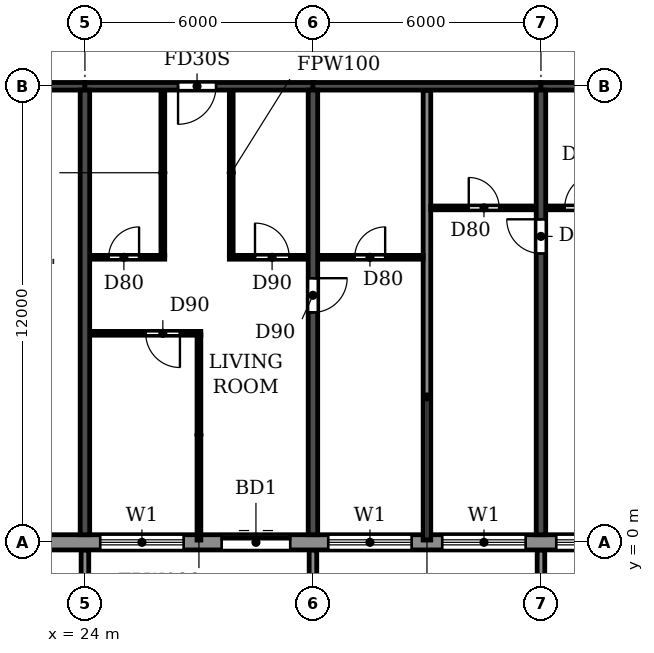
"""IFC4 building model, lengths in metres.
Left out: names, types, materials, properties, quantities, classifications, styles, units other than length and angle.
Written with IfcOpenShell. Run it as: python <this file> out.ifc"""

import sys

from ifc_helpers import new_model, si_unit, direction, frame, frame_2d, origin, place, context, subcontext, project, spatial, polyline, rectangle, outline, extrude, source, transform, mapped, element, fill, save


model = new_model("IFC4")
c1 = context("Model", 3, precision=1e-05, world=origin(), true_north=direction((0.0, 1.0)))
c2 = subcontext(c1, "Body", "Model", "MODEL_VIEW")
j1 = project(units=[si_unit("LENGTHUNIT", "METRE"), si_unit("PLANEANGLEUNIT", "RADIAN")], contexts=[c1])
p1 = place(None, origin())
s1 = spatial("IfcSite", under=j1, at=p1, CompositionType="ELEMENT")
p2 = place(p1, origin())
s2 = spatial("IfcBuilding", under=s1, at=p2, CompositionType="ELEMENT")
p3 = place(p2, frame((0.0, 0.0, 257.7)))
s3 = spatial("IfcBuildingStorey", under=s2, at=p3, CompositionType="ELEMENT", Elevation=257.7)
p4 = place(p3, frame((24.0, 0.2, 0.0), z_axis=(0.0, 0.0, 1.0), x_axis=(0.0, 1.0, 0.0)))
e1 = element("IfcWall", 1, at=p4, inside=s3, PredefinedType="SHEAR", context=c2, shape_type="SweptSolid", body=[
    extrude(rectangle(XDim=11.7, YDim=0.25, at=frame_2d((5.85, 0.0))), origin(), (0.0, 0.0, 1.0), 3.0),
])
p5 = place(p3, frame((30.0, 0.2, 0.0), z_axis=(0.0, 0.0, 1.0), x_axis=(0.0, 1.0, 0.0)))
e2 = element("IfcWall", 2, at=p5, inside=s3, PredefinedType="SHEAR", context=c2, shape_type="SweptSolid", body=[
    extrude(rectangle(XDim=11.7, YDim=0.25, at=frame_2d((5.85, 0.0))), origin(), (0.0, 0.0, 1.0), 3.0),
])
p6 = place(p5, frame((5.85, 0.0, 0.0)))
e3 = element("IfcOpeningElement", 3, at=p6, cuts=e2, PredefinedType="OPENING", context=c2, shape_type="SweptSolid", body=[
    extrude(rectangle(XDim=0.9, YDim=2.1, at=frame_2d((0.45, 1.05))), frame((0.0, 0.135, 0.0), z_axis=(0.0, -1.0, 0.0), x_axis=(1.0, 0.0, 0.0)), (0.0, 0.0, 1.0), 0.27),
])
p7 = place(p3, frame((36.0, 0.2, 0.0), z_axis=(0.0, 0.0, 1.0), x_axis=(0.0, 1.0, 0.0)))
e4 = element("IfcWall", 4, at=p7, inside=s3, PredefinedType="SHEAR", context=c2, shape_type="SweptSolid", body=[
    extrude(rectangle(XDim=11.7, YDim=0.25, at=frame_2d((5.85, 0.0))), origin(), (0.0, 0.0, 1.0), 3.0),
])
p8 = place(p7, frame((7.4, 0.0, 0.0)))
e5 = element("IfcOpeningElement", 5, at=p8, cuts=e4, PredefinedType="OPENING", context=c2, shape_type="SweptSolid", body=[
    extrude(rectangle(XDim=0.9, YDim=2.1, at=frame_2d((0.45, 1.05))), frame((0.0, 0.135, 0.0), z_axis=(0.0, -1.0, 0.0), x_axis=(1.0, 0.0, 0.0)), (0.0, 0.0, 1.0), 0.27),
])
p9 = place(p3, frame((18.2, 12.0, 0.0), z_axis=(0.0, 0.0, 1.0), x_axis=(1.0, 0.0, 0.0)))
e6 = element("IfcWall", 6, at=p9, inside=s3, PredefinedType="SHEAR", context=c2, shape_type="SweptSolid", body=[
    extrude(rectangle(XDim=5.8, YDim=0.2, at=frame_2d((2.9, 0.0))), origin(), (0.0, 0.0, 1.0), 2.4),
])
p10 = place(p9, frame((2.3, 0.0, 0.0)))
e7 = element("IfcOpeningElement", 7, at=p10, cuts=e6, PredefinedType="OPENING", context=c2, shape_type="SweptSolid", body=[
    extrude(rectangle(XDim=1.0, YDim=2.1, at=frame_2d((0.5, 1.05))), frame((0.0, 0.11, 0.0), z_axis=(0.0, -1.0, 0.0), x_axis=(1.0, 0.0, 0.0)), (0.0, 0.0, 1.0), 0.22),
])
p11 = place(p3, frame((24.0, 12.0, 0.0), z_axis=(0.0, 0.0, 1.0), x_axis=(1.0, 0.0, 0.0)))
e8 = element("IfcWall", 8, at=p11, inside=s3, PredefinedType="SHEAR", context=c2, shape_type="SweptSolid", body=[
    extrude(rectangle(XDim=6.0, YDim=0.2, at=frame_2d((3.0, 0.0))), origin(), (0.0, 0.0, 1.0), 2.4),
])
p12 = place(p11, frame((2.45, 0.0, 0.0)))
e9 = element("IfcOpeningElement", 9, at=p12, cuts=e8, PredefinedType="OPENING", context=c2, shape_type="SweptSolid", body=[
    extrude(rectangle(XDim=1.0, YDim=2.1, at=frame_2d((0.5, 1.05))), frame((0.0, 0.11, 0.0), z_axis=(0.0, -1.0, 0.0), x_axis=(1.0, 0.0, 0.0)), (0.0, 0.0, 1.0), 0.22),
])
p13 = place(p3, frame((30.0, 12.0, 0.0), z_axis=(0.0, 0.0, 1.0), x_axis=(1.0, 0.0, 0.0)))
e10 = element("IfcWall", 10, at=p13, inside=s3, PredefinedType="SHEAR", context=c2, shape_type="SweptSolid", body=[
    extrude(rectangle(XDim=6.0, YDim=0.2, at=frame_2d((3.0, 0.0))), origin(), (0.0, 0.0, 1.0), 2.4),
])
p14 = place(p3, frame((36.0, 12.0, 0.0), z_axis=(0.0, 0.0, 1.0), x_axis=(1.0, 0.0, 0.0)))
e11 = element("IfcWall", 11, at=p14, inside=s3, PredefinedType="SHEAR", context=c2, shape_type="SweptSolid", body=[
    extrude(rectangle(XDim=6.0, YDim=0.2, at=frame_2d((3.0, 0.0))), origin(), (0.0, 0.0, 1.0), 2.4),
])
p15 = place(p14, frame((2.55, 0.0, 0.0)))
e12 = element("IfcOpeningElement", 12, at=p15, cuts=e11, PredefinedType="OPENING", context=c2, shape_type="SweptSolid", body=[
    extrude(rectangle(XDim=1.0, YDim=2.1, at=frame_2d((0.5, 1.05))), frame((0.0, 0.11, 0.0), z_axis=(0.0, -1.0, 0.0), x_axis=(1.0, 0.0, 0.0)), (0.0, 0.0, 1.0), 0.22),
])
p16 = place(p3, frame((22.683, 0.0, 0.0), z_axis=(0.0, 0.0, 1.0), x_axis=(1.0, 0.0, 0.0)))
e13 = element("IfcWall", 13, at=p16, inside=s3, PredefinedType="STANDARD", context=c2, shape_type="SweptSolid", body=[
    extrude(rectangle(XDim=56.634, YDim=0.4, at=frame_2d((28.317, 0.0))), origin(), (0.0, 0.0, 1.0), 3.0),
])
p17 = place(p16, frame((1.717, 0.0, 0.9)))
e14 = element("IfcOpeningElement", 14, at=p17, cuts=e13, PredefinedType="OPENING", context=c2, shape_type="SweptSolid", body=[
    extrude(rectangle(XDim=2.2, YDim=1.5, at=frame_2d((1.1, 0.75))), frame((0.0, 0.21, 0.0), z_axis=(0.0, -1.0, 0.0), x_axis=(1.0, 0.0, 0.0)), (0.0, 0.0, 1.0), 0.42),
])
p18 = place(p16, frame((4.917, 0.0, 0.0)))
e15 = element("IfcOpeningElement", 15, at=p18, cuts=e13, PredefinedType="OPENING", context=c2, shape_type="SweptSolid", body=[
    extrude(rectangle(XDim=1.8, YDim=2.4, at=frame_2d((0.9, 1.2))), frame((0.0, 0.21, 0.0), z_axis=(0.0, -1.0, 0.0), x_axis=(1.0, 0.0, 0.0)), (0.0, 0.0, 1.0), 0.42),
])
p19 = place(p16, frame((7.717, 0.0, 0.9)))
e16 = element("IfcOpeningElement", 16, at=p19, cuts=e13, PredefinedType="OPENING", context=c2, shape_type="SweptSolid", body=[
    extrude(rectangle(XDim=2.2, YDim=1.5, at=frame_2d((1.1, 0.75))), frame((0.0, 0.21, 0.0), z_axis=(0.0, -1.0, 0.0), x_axis=(1.0, 0.0, 0.0)), (0.0, 0.0, 1.0), 0.42),
])
p20 = place(p16, frame((10.717, 0.0, 0.9)))
e17 = element("IfcOpeningElement", 17, at=p20, cuts=e13, PredefinedType="OPENING", context=c2, shape_type="SweptSolid", body=[
    extrude(rectangle(XDim=2.2, YDim=1.5, at=frame_2d((1.1, 0.75))), frame((0.0, 0.21, 0.0), z_axis=(0.0, -1.0, 0.0), x_axis=(1.0, 0.0, 0.0)), (0.0, 0.0, 1.0), 0.42),
])
p21 = place(p16, frame((13.717, 0.0, 0.9)))
e18 = element("IfcOpeningElement", 18, at=p21, cuts=e13, PredefinedType="OPENING", context=c2, shape_type="SweptSolid", body=[
    extrude(rectangle(XDim=2.2, YDim=1.5, at=frame_2d((1.1, 0.75))), frame((0.0, 0.21, 0.0), z_axis=(0.0, -1.0, 0.0), x_axis=(1.0, 0.0, 0.0)), (0.0, 0.0, 1.0), 0.42),
])
p22 = place(p16, frame((16.917, 0.0, 0.0)))
e19 = element("IfcOpeningElement", 19, at=p22, cuts=e13, PredefinedType="OPENING", context=c2, shape_type="SweptSolid", body=[
    extrude(rectangle(XDim=1.8, YDim=2.4, at=frame_2d((0.9, 1.2))), frame((0.0, 0.21, 0.0), z_axis=(0.0, -1.0, 0.0), x_axis=(1.0, 0.0, 0.0)), (0.0, 0.0, 1.0), 0.42),
])
p23 = place(p16, frame((19.717, 0.0, 0.9)))
e20 = element("IfcOpeningElement", 20, at=p23, cuts=e13, PredefinedType="OPENING", context=c2, shape_type="SweptSolid", body=[
    extrude(rectangle(XDim=2.2, YDim=1.5, at=frame_2d((1.1, 0.75))), frame((0.0, 0.21, 0.0), z_axis=(0.0, -1.0, 0.0), x_axis=(1.0, 0.0, 0.0)), (0.0, 0.0, 1.0), 0.42),
])
p24 = place(p16, frame((22.717, 0.0, 0.9)))
e21 = element("IfcOpeningElement", 21, at=p24, cuts=e13, PredefinedType="OPENING", context=c2, shape_type="SweptSolid", body=[
    extrude(rectangle(XDim=2.2, YDim=1.5, at=frame_2d((1.1, 0.75))), frame((0.0, 0.21, 0.0), z_axis=(0.0, -1.0, 0.0), x_axis=(1.0, 0.0, 0.0)), (0.0, 0.0, 1.0), 0.42),
])
p25 = place(p16, frame((25.717, 0.0, 0.9)))
e22 = element("IfcOpeningElement", 22, at=p25, cuts=e13, PredefinedType="OPENING", context=c2, shape_type="SweptSolid", body=[
    extrude(rectangle(XDim=2.2, YDim=1.5, at=frame_2d((1.1, 0.75))), frame((0.0, 0.21, 0.0), z_axis=(0.0, -1.0, 0.0), x_axis=(1.0, 0.0, 0.0)), (0.0, 0.0, 1.0), 0.42),
])
p26 = place(p16, frame((28.917, 0.0, 0.0)))
e23 = element("IfcOpeningElement", 23, at=p26, cuts=e13, PredefinedType="OPENING", context=c2, shape_type="SweptSolid", body=[
    extrude(rectangle(XDim=1.8, YDim=2.4, at=frame_2d((0.9, 1.2))), frame((0.0, 0.21, 0.0), z_axis=(0.0, -1.0, 0.0), x_axis=(1.0, 0.0, 0.0)), (0.0, 0.0, 1.0), 0.42),
])
p27 = place(p16, frame((31.717, 0.0, 0.9)))
e24 = element("IfcOpeningElement", 24, at=p27, cuts=e13, PredefinedType="OPENING", context=c2, shape_type="SweptSolid", body=[
    extrude(rectangle(XDim=2.2, YDim=1.5, at=frame_2d((1.1, 0.75))), frame((0.0, 0.21, 0.0), z_axis=(0.0, -1.0, 0.0), x_axis=(1.0, 0.0, 0.0)), (0.0, 0.0, 1.0), 0.42),
])
p28 = place(p16, frame((34.717, 0.0, 0.9)))
e25 = element("IfcOpeningElement", 25, at=p28, cuts=e13, PredefinedType="OPENING", context=c2, shape_type="SweptSolid", body=[
    extrude(rectangle(XDim=2.2, YDim=1.5, at=frame_2d((1.1, 0.75))), frame((0.0, 0.21, 0.0), z_axis=(0.0, -1.0, 0.0), x_axis=(1.0, 0.0, 0.0)), (0.0, 0.0, 1.0), 0.42),
])
p29 = place(p16, frame((37.717, 0.0, 0.9)))
e26 = element("IfcOpeningElement", 26, at=p29, cuts=e13, PredefinedType="OPENING", context=c2, shape_type="SweptSolid", body=[
    extrude(rectangle(XDim=2.2, YDim=1.5, at=frame_2d((1.1, 0.75))), frame((0.0, 0.21, 0.0), z_axis=(0.0, -1.0, 0.0), x_axis=(1.0, 0.0, 0.0)), (0.0, 0.0, 1.0), 0.42),
])
p30 = place(p16, frame((40.917, 0.0, 0.0)))
e27 = element("IfcOpeningElement", 27, at=p30, cuts=e13, PredefinedType="OPENING", context=c2, shape_type="SweptSolid", body=[
    extrude(rectangle(XDim=1.8, YDim=2.4, at=frame_2d((0.9, 1.2))), frame((0.0, 0.21, 0.0), z_axis=(0.0, -1.0, 0.0), x_axis=(1.0, 0.0, 0.0)), (0.0, 0.0, 1.0), 0.42),
])
p31 = place(p16, frame((43.717, 0.0, 0.9)))
e28 = element("IfcOpeningElement", 28, at=p31, cuts=e13, PredefinedType="OPENING", context=c2, shape_type="SweptSolid", body=[
    extrude(rectangle(XDim=2.2, YDim=1.5, at=frame_2d((1.1, 0.75))), frame((0.0, 0.21, 0.0), z_axis=(0.0, -1.0, 0.0), x_axis=(1.0, 0.0, 0.0)), (0.0, 0.0, 1.0), 0.42),
])
p32 = place(p16, frame((46.717, 0.0, 0.9)))
e29 = element("IfcOpeningElement", 29, at=p32, cuts=e13, PredefinedType="OPENING", context=c2, shape_type="SweptSolid", body=[
    extrude(rectangle(XDim=2.2, YDim=1.5, at=frame_2d((1.1, 0.75))), frame((0.0, 0.21, 0.0), z_axis=(0.0, -1.0, 0.0), x_axis=(1.0, 0.0, 0.0)), (0.0, 0.0, 1.0), 0.42),
])
p33 = place(p16, frame((49.717, 0.0, 0.9)))
e30 = element("IfcOpeningElement", 30, at=p33, cuts=e13, PredefinedType="OPENING", context=c2, shape_type="SweptSolid", body=[
    extrude(rectangle(XDim=2.2, YDim=1.5, at=frame_2d((1.1, 0.75))), frame((0.0, 0.21, 0.0), z_axis=(0.0, -1.0, 0.0), x_axis=(1.0, 0.0, 0.0)), (0.0, 0.0, 1.0), 0.42),
])
p34 = place(p16, frame((52.917, 0.0, 0.0)))
e31 = element("IfcOpeningElement", 31, at=p34, cuts=e13, PredefinedType="OPENING", context=c2, shape_type="SweptSolid", body=[
    extrude(rectangle(XDim=1.8, YDim=2.4, at=frame_2d((0.9, 1.2))), frame((0.0, 0.21, 0.0), z_axis=(0.0, -1.0, 0.0), x_axis=(1.0, 0.0, 0.0)), (0.0, 0.0, 1.0), 0.42),
])
m1 = source(origin(), c2, "Body", "SweptSolid", [
    extrude(outline(polyline([(0.0, 0.0), (0.2, 0.0), (0.2, 1.65), (0.0, 1.65), (0.0, 0.0)])), origin(), (0.0, 0.0, 1.0), 3.1),
])
for number, where in (
    (32, (23.9, -1.85, 0.0)),
    (33, (29.9, -1.85, 0.0)),
    (34, (35.9, -1.85, 0.0)),
):
    element("IfcWall", number, at=place(p3, frame(where)), inside=s3, PredefinedType="STANDARD", context=c2, shape_type="MappedRepresentation", body=[
        mapped(m1, transform((0.0, 0.0, 0.0))),
    ])
p35 = place(p3, frame((33.0, 0.06, 0.0), z_axis=(0.0, 0.0, 1.0), x_axis=(0.0, 1.0, 0.0)))
e35 = element("IfcWall", 35, at=p35, inside=s3, PredefinedType="PARTITIONING", context=c2, shape_type="SweptSolid", body=[
    extrude(rectangle(XDim=11.83, YDim=0.2, at=frame_2d((5.915, 0.0))), origin(), (0.0, 0.0, 1.0), 3.0),
])
p36 = place(p3, frame((24.135, 5.5, 0.0), z_axis=(0.0, 0.0, 1.0), x_axis=(1.0, 0.0, 0.0)))
e36 = element("IfcWall", 36, at=p36, inside=s3, PredefinedType="PARTITIONING", context=c2, shape_type="SweptSolid", body=[
    extrude(rectangle(XDim=2.915, YDim=0.1, at=frame_2d((1.458, 0.0))), origin(), (0.0, 0.0, 1.0), 3.0),
])
p37 = place(p36, frame((1.465, 0.0, 0.0)))
e37 = element("IfcOpeningElement", 37, at=p37, cuts=e36, PredefinedType="OPENING", context=c2, shape_type="SweptSolid", body=[
    extrude(rectangle(XDim=0.9, YDim=2.1, at=frame_2d((0.45, 1.05))), frame((0.0, 0.06, 0.0), z_axis=(0.0, -1.0, 0.0), x_axis=(1.0, 0.0, 0.0)), (0.0, 0.0, 1.0), 0.12),
])
p38 = place(p3, frame((24.135, 7.5, 0.0), z_axis=(0.0, 0.0, 1.0), x_axis=(1.0, 0.0, 0.0)))
e38 = element("IfcWall", 38, at=p38, inside=s3, PredefinedType="PARTITIONING", context=c2, shape_type="SweptSolid", body=[
    extrude(rectangle(XDim=1.965, YDim=0.1, at=frame_2d((0.982, 0.0))), origin(), (0.0, 0.0, 1.0), 3.0),
])
p39 = place(p38, frame((0.49, 0.0, 0.0)))
e39 = element("IfcOpeningElement", 39, at=p39, cuts=e38, PredefinedType="OPENING", context=c2, shape_type="SweptSolid", body=[
    extrude(rectangle(XDim=0.8, YDim=2.1, at=frame_2d((0.4, 1.05))), frame((0.0, 0.06, 0.0), z_axis=(0.0, -1.0, 0.0), x_axis=(1.0, 0.0, 0.0)), (0.0, 0.0, 1.0), 0.12),
])
p40 = place(p3, frame((27.8, 7.5, 0.0), z_axis=(0.0, 0.0, 1.0), x_axis=(1.0, 0.0, 0.0)))
e40 = element("IfcWall", 40, at=p40, inside=s3, PredefinedType="PARTITIONING", context=c2, shape_type="SweptSolid", body=[
    extrude(rectangle(XDim=2.065, YDim=0.1, at=frame_2d((1.032, 0.0))), origin(), (0.0, 0.0, 1.0), 3.0),
])
p41 = place(p40, frame((0.675, 0.0, 0.0)))
e41 = element("IfcOpeningElement", 41, at=p41, cuts=e40, PredefinedType="OPENING", context=c2, shape_type="SweptSolid", body=[
    extrude(rectangle(XDim=0.9, YDim=2.1, at=frame_2d((0.45, 1.05))), frame((0.0, 0.06, 0.0), z_axis=(0.0, -1.0, 0.0), x_axis=(1.0, 0.0, 0.0)), (0.0, 0.0, 1.0), 0.12),
])
p42 = place(p3, frame((30.135, 7.5, 0.0), z_axis=(0.0, 0.0, 1.0), x_axis=(1.0, 0.0, 0.0)))
e42 = element("IfcWall", 42, at=p42, inside=s3, PredefinedType="PARTITIONING", context=c2, shape_type="SweptSolid", body=[
    extrude(rectangle(XDim=2.765, YDim=0.1, at=frame_2d((1.382, 0.0))), origin(), (0.0, 0.0, 1.0), 3.0),
])
p43 = place(p42, frame((0.965, 0.0, 0.0)))
e43 = element("IfcOpeningElement", 43, at=p43, cuts=e42, PredefinedType="OPENING", context=c2, shape_type="SweptSolid", body=[
    extrude(rectangle(XDim=0.8, YDim=2.1, at=frame_2d((0.4, 1.05))), frame((0.0, 0.06, 0.0), z_axis=(0.0, -1.0, 0.0), x_axis=(1.0, 0.0, 0.0)), (0.0, 0.0, 1.0), 0.12),
])
p44 = place(p3, frame((33.1, 8.8, 0.0), z_axis=(0.0, 0.0, 1.0), x_axis=(1.0, 0.0, 0.0)))
e44 = element("IfcWall", 44, at=p44, inside=s3, PredefinedType="PARTITIONING", context=c2, shape_type="SweptSolid", body=[
    extrude(rectangle(XDim=2.765, YDim=0.1, at=frame_2d((1.382, 0.0))), origin(), (0.0, 0.0, 1.0), 3.0),
])
p45 = place(p44, frame((1.0, 0.0, 0.0)))
e45 = element("IfcOpeningElement", 45, at=p45, cuts=e44, PredefinedType="OPENING", context=c2, shape_type="SweptSolid", body=[
    extrude(rectangle(XDim=0.8, YDim=2.1, at=frame_2d((0.4, 1.05))), frame((0.0, 0.06, 0.0), z_axis=(0.0, -1.0, 0.0), x_axis=(1.0, 0.0, 0.0)), (0.0, 0.0, 1.0), 0.12),
])
p46 = place(p3, frame((36.135, 8.8, 0.0), z_axis=(0.0, 0.0, 1.0), x_axis=(1.0, 0.0, 0.0)))
e46 = element("IfcWall", 46, at=p46, inside=s3, PredefinedType="PARTITIONING", context=c2, shape_type="SweptSolid", body=[
    extrude(rectangle(XDim=2.065, YDim=0.1, at=frame_2d((1.032, 0.0))), origin(), (0.0, 0.0, 1.0), 3.0),
])
p47 = place(p46, frame((0.49, 0.0, 0.0)))
e47 = element("IfcOpeningElement", 47, at=p47, cuts=e46, PredefinedType="OPENING", context=c2, shape_type="SweptSolid", body=[
    extrude(rectangle(XDim=0.9, YDim=2.1, at=frame_2d((0.45, 1.05))), frame((0.0, 0.06, 0.0), z_axis=(0.0, -1.0, 0.0), x_axis=(1.0, 0.0, 0.0)), (0.0, 0.0, 1.0), 0.12),
])
p48 = place(p3, frame((26.05, 7.55, 0.0), z_axis=(0.0, 0.0, 1.0), x_axis=(0.0, 1.0, 0.0)))
e48 = element("IfcWall", 48, at=p48, inside=s3, PredefinedType="PARTITIONING", context=c2, shape_type="SweptSolid", body=[
    extrude(rectangle(XDim=4.34, YDim=0.1, at=frame_2d((2.17, 0.0))), origin(), (0.0, 0.0, 1.0), 3.0),
])
p49 = place(p3, frame((27.0, 0.06, 0.0), z_axis=(0.0, 0.0, 1.0), x_axis=(0.0, 1.0, 0.0)))
e49 = element("IfcWall", 49, at=p49, inside=s3, PredefinedType="PARTITIONING", context=c2, shape_type="SweptSolid", body=[
    extrude(rectangle(XDim=5.39, YDim=0.1, at=frame_2d((2.695, 0.0))), origin(), (0.0, 0.0, 1.0), 3.0),
])
p50 = place(p3, frame((27.85, 7.55, 0.0), z_axis=(0.0, 0.0, 1.0), x_axis=(0.0, 1.0, 0.0)))
e50 = element("IfcWall", 50, at=p50, inside=s3, PredefinedType="PARTITIONING", context=c2, shape_type="SweptSolid", body=[
    extrude(rectangle(XDim=4.34, YDim=0.1, at=frame_2d((2.17, 0.0))), origin(), (0.0, 0.0, 1.0), 3.0),
])
p51 = place(p17, origin())
e51 = element("IfcWindow", 51, at=p51, inside=s3, PartitioningType="DOUBLE_PANEL_HORIZONTAL", PredefinedType="WINDOW", context=c2, shape_type="SweptSolid", body=[
    extrude(rectangle(XDim=2.2, YDim=1.5, at=frame_2d((1.1, 0.75))), frame((0.0, 0.03, 0.0), z_axis=(0.0, -1.0, 0.0), x_axis=(1.0, 0.0, 0.0)), (0.0, 0.0, 1.0), 0.06),
])
fill(e14, e51)
p52 = place(p18, origin())
e52 = element("IfcDoor", 52, at=p52, inside=s3, OperationType="DOUBLE_DOOR_SLIDING", PredefinedType="DOOR", context=c2, shape_type="SweptSolid", body=[
    extrude(rectangle(XDim=1.8, YDim=2.4, at=frame_2d((0.9, 1.2))), frame((0.0, 0.025, 0.0), z_axis=(0.0, -1.0, 0.0), x_axis=(1.0, 0.0, 0.0)), (0.0, 0.0, 1.0), 0.05),
])
fill(e15, e52)
p53 = place(p19, origin())
e53 = element("IfcWindow", 53, at=p53, inside=s3, PartitioningType="DOUBLE_PANEL_HORIZONTAL", PredefinedType="WINDOW", context=c2, shape_type="SweptSolid", body=[
    extrude(rectangle(XDim=2.2, YDim=1.5, at=frame_2d((1.1, 0.75))), frame((0.0, 0.03, 0.0), z_axis=(0.0, -1.0, 0.0), x_axis=(1.0, 0.0, 0.0)), (0.0, 0.0, 1.0), 0.06),
])
fill(e16, e53)
p54 = place(p20, origin())
e54 = element("IfcWindow", 54, at=p54, inside=s3, PartitioningType="DOUBLE_PANEL_HORIZONTAL", PredefinedType="WINDOW", context=c2, shape_type="SweptSolid", body=[
    extrude(rectangle(XDim=2.2, YDim=1.5, at=frame_2d((1.1, 0.75))), frame((0.0, 0.03, 0.0), z_axis=(0.0, -1.0, 0.0), x_axis=(1.0, 0.0, 0.0)), (0.0, 0.0, 1.0), 0.06),
])
fill(e17, e54)
p55 = place(p21, origin())
e55 = element("IfcWindow", 55, at=p55, inside=s3, PartitioningType="DOUBLE_PANEL_HORIZONTAL", PredefinedType="WINDOW", context=c2, shape_type="SweptSolid", body=[
    extrude(rectangle(XDim=2.2, YDim=1.5, at=frame_2d((1.1, 0.75))), frame((0.0, 0.03, 0.0), z_axis=(0.0, -1.0, 0.0), x_axis=(1.0, 0.0, 0.0)), (0.0, 0.0, 1.0), 0.06),
])
fill(e18, e55)
p56 = place(p43, origin())
e56 = element("IfcDoor", 56, at=p56, inside=s3, OperationType="SINGLE_SWING_RIGHT", PredefinedType="DOOR", context=c2, shape_type="SweptSolid", body=[
    extrude(rectangle(XDim=0.8, YDim=2.1, at=frame_2d((0.4, 1.05))), frame((0.0, 0.025, 0.0), z_axis=(0.0, -1.0, 0.0), x_axis=(1.0, 0.0, 0.0)), (0.0, 0.0, 1.0), 0.05),
])
fill(e43, e56)
p57 = place(p39, origin())
e57 = element("IfcDoor", 57, at=p57, inside=s3, OperationType="SINGLE_SWING_RIGHT", PredefinedType="DOOR", context=c2, shape_type="SweptSolid", body=[
    extrude(rectangle(XDim=0.8, YDim=2.1, at=frame_2d((0.4, 1.05))), frame((0.0, 0.025, 0.0), z_axis=(0.0, -1.0, 0.0), x_axis=(1.0, 0.0, 0.0)), (0.0, 0.0, 1.0), 0.05),
])
fill(e39, e57)
p58 = place(p37, frame((0.9, 0.0, 0.0), z_axis=(0.0, 0.0, 1.0), x_axis=(-1.0, 0.0, 0.0)))
e58 = element("IfcDoor", 58, at=p58, inside=s3, OperationType="SINGLE_SWING_LEFT", PredefinedType="DOOR", context=c2, shape_type="SweptSolid", body=[
    extrude(rectangle(XDim=0.9, YDim=2.1, at=frame_2d((0.45, 1.05))), frame((0.0, 0.025, 0.0), z_axis=(0.0, -1.0, 0.0), x_axis=(1.0, 0.0, 0.0)), (0.0, 0.0, 1.0), 0.05),
])
fill(e37, e58)
p59 = place(p12, frame((1.0, 0.0, 0.0), z_axis=(0.0, 0.0, 1.0), x_axis=(-1.0, 0.0, 0.0)))
e59 = element("IfcDoor", 59, at=p59, inside=s3, OperationType="SINGLE_SWING_RIGHT", PredefinedType="DOOR", context=c2, shape_type="SweptSolid", body=[
    extrude(rectangle(XDim=1.0, YDim=2.1, at=frame_2d((0.5, 1.05))), frame((0.0, 0.025, 0.0), z_axis=(0.0, -1.0, 0.0), x_axis=(1.0, 0.0, 0.0)), (0.0, 0.0, 1.0), 0.05),
])
fill(e9, e59)
p60 = place(p41, origin())
e60 = element("IfcDoor", 60, at=p60, inside=s3, OperationType="SINGLE_SWING_LEFT", PredefinedType="DOOR", context=c2, shape_type="SweptSolid", body=[
    extrude(rectangle(XDim=0.9, YDim=2.1, at=frame_2d((0.45, 1.05))), frame((0.0, 0.025, 0.0), z_axis=(0.0, -1.0, 0.0), x_axis=(1.0, 0.0, 0.0)), (0.0, 0.0, 1.0), 0.05),
])
fill(e41, e60)
p61 = place(p6, frame((0.9, 0.0, 0.0), z_axis=(0.0, 0.0, 1.0), x_axis=(-1.0, 0.0, 0.0)))
e61 = element("IfcDoor", 61, at=p61, inside=s3, OperationType="SINGLE_SWING_LEFT", PredefinedType="DOOR", context=c2, shape_type="SweptSolid", body=[
    extrude(rectangle(XDim=0.9, YDim=2.1, at=frame_2d((0.45, 1.05))), frame((0.0, 0.025, 0.0), z_axis=(0.0, -1.0, 0.0), x_axis=(1.0, 0.0, 0.0)), (0.0, 0.0, 1.0), 0.05),
])
fill(e3, e61)
p62 = place(p45, origin())
e62 = element("IfcDoor", 62, at=p62, inside=s3, OperationType="SINGLE_SWING_LEFT", PredefinedType="DOOR", context=c2, shape_type="SweptSolid", body=[
    extrude(rectangle(XDim=0.8, YDim=2.1, at=frame_2d((0.4, 1.05))), frame((0.0, 0.025, 0.0), z_axis=(0.0, -1.0, 0.0), x_axis=(1.0, 0.0, 0.0)), (0.0, 0.0, 1.0), 0.05),
])
fill(e45, e62)
p63 = place(p8, origin())
e63 = element("IfcDoor", 63, at=p63, inside=s3, OperationType="SINGLE_SWING_RIGHT", PredefinedType="DOOR", context=c2, shape_type="SweptSolid", body=[
    extrude(rectangle(XDim=0.9, YDim=2.1, at=frame_2d((0.45, 1.05))), frame((0.0, 0.025, 0.0), z_axis=(0.0, -1.0, 0.0), x_axis=(1.0, 0.0, 0.0)), (0.0, 0.0, 1.0), 0.05),
])
fill(e5, e63)
p64 = place(p47, origin())
e64 = element("IfcDoor", 64, at=p64, inside=s3, OperationType="SINGLE_SWING_RIGHT", PredefinedType="DOOR", context=c2, shape_type="SweptSolid", body=[
    extrude(rectangle(XDim=0.9, YDim=2.1, at=frame_2d((0.45, 1.05))), frame((0.0, 0.025, 0.0), z_axis=(0.0, -1.0, 0.0), x_axis=(1.0, 0.0, 0.0)), (0.0, 0.0, 1.0), 0.05),
])
fill(e47, e64)
save(model, sys.argv[1])
